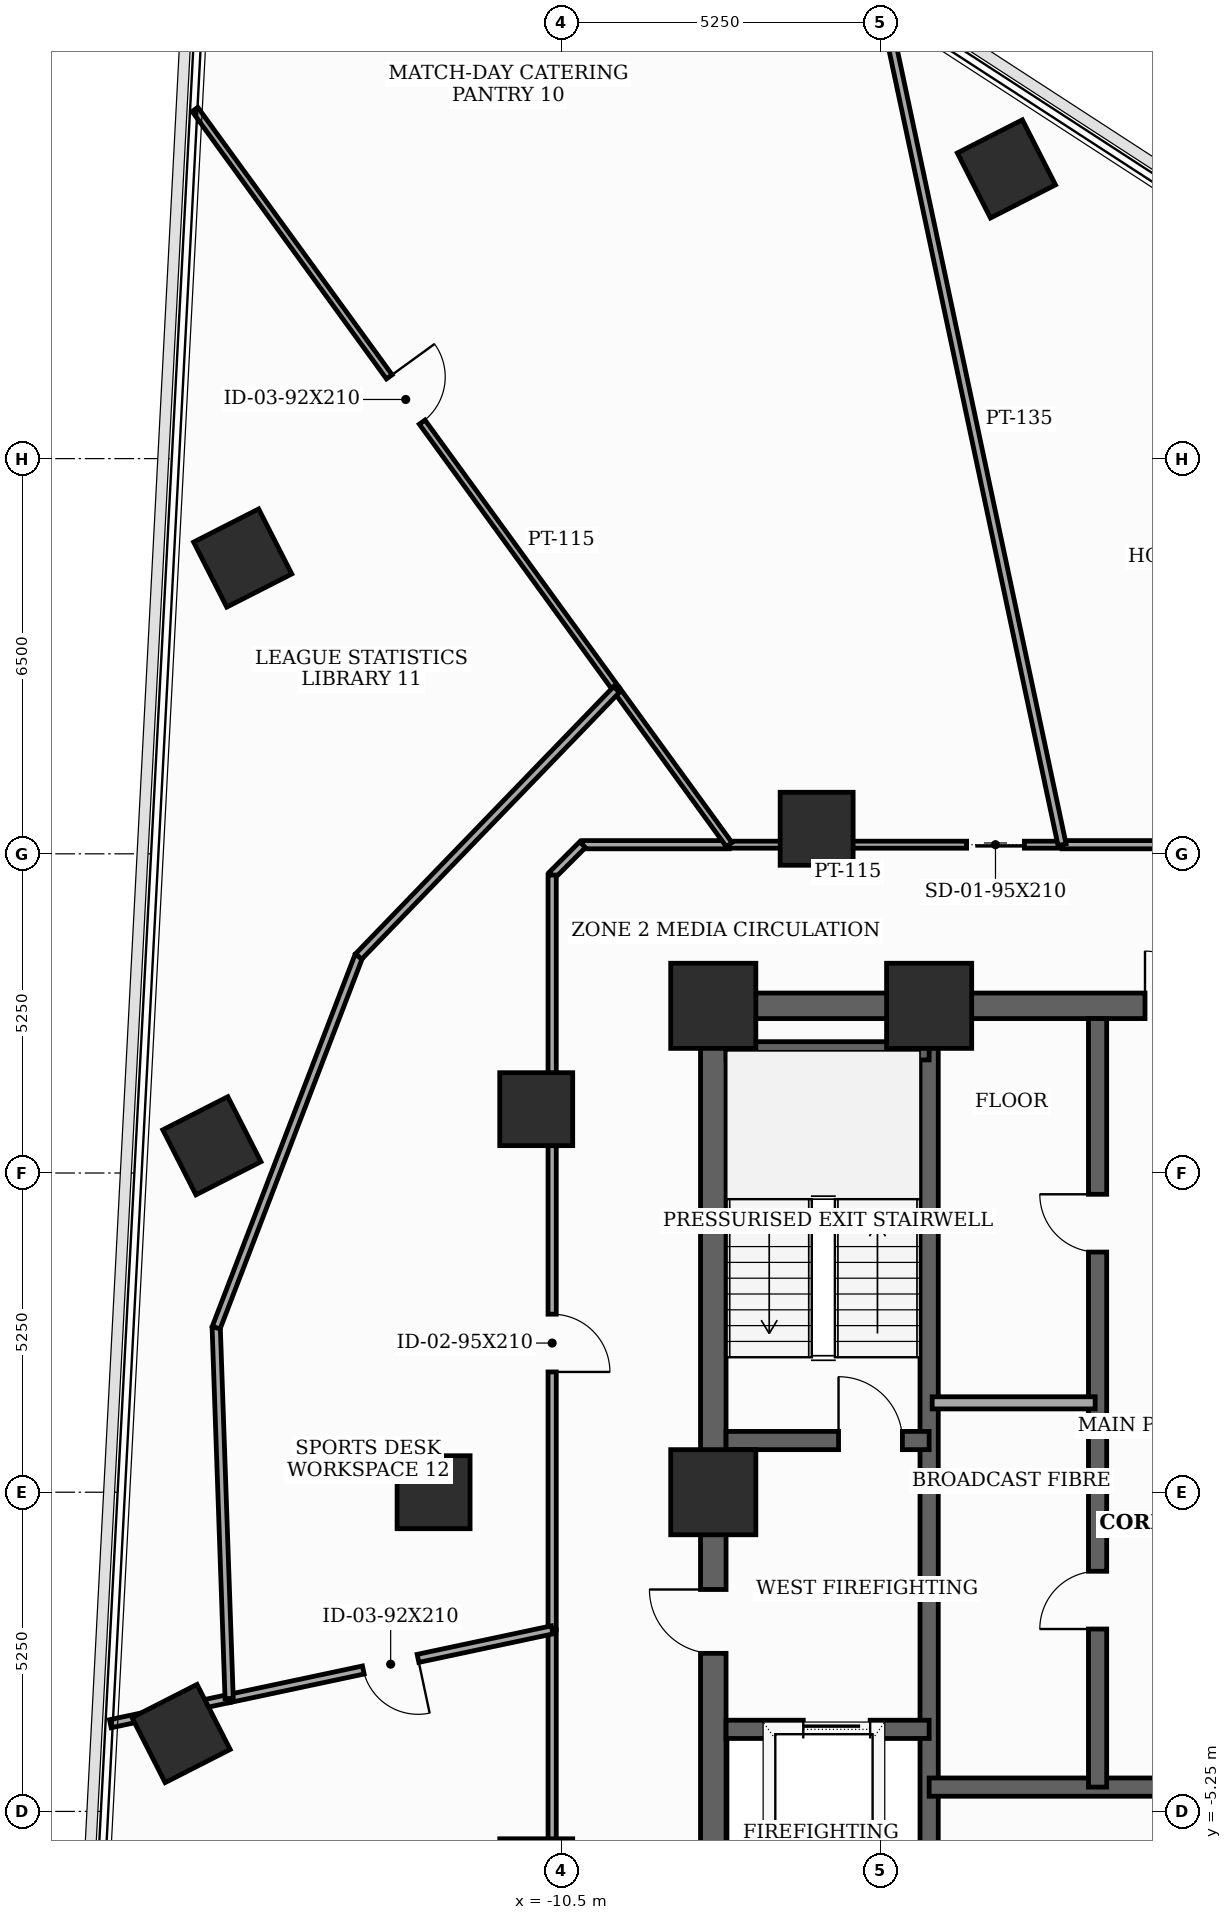
"""IFC4 building model, lengths in metres.
Left out: names, types, materials, properties, quantities, classifications, styles, units other than length and angle.
Written with IfcOpenShell. Run it as: python <this file> out.ifc"""

import sys

from ifc_helpers import new_model, si_unit, direction, frame, frame_2d, origin, origin_2d, place, context, subcontext, project, spatial, rectangle, extrude, element, fill, save


model = new_model("IFC4")
c1 = context("Model", 3, precision=1e-05, world=origin(), true_north=direction((0.0, 1.0)))
c2 = subcontext(c1, "Body", "Model", "MODEL_VIEW")
j1 = project(units=[si_unit("LENGTHUNIT", "METRE"), si_unit("PLANEANGLEUNIT", "RADIAN")], contexts=[c1])
p1 = place(None, origin())
s1 = spatial("IfcSite", under=j1, at=p1, CompositionType="ELEMENT")
p2 = place(p1, origin())
s2 = spatial("IfcBuilding", under=s1, at=p2, CompositionType="ELEMENT")
p3 = place(p2, frame((0.0, 0.0, 123.6)))
s3 = spatial("IfcBuildingStorey", under=s2, at=p3, CompositionType="ELEMENT", Elevation=123.6)
for number, where, z_axis, x_axis in (
    (1, (-4.45, 8.0, 0.0), (0.0, 0.0, 1.0), (1.0, 0.0, 0.0)),
    (2, (-8.0, 8.0, 0.0), (0.0, 0.0, 1.0), (1.0, 0.0, 0.0)),
    (3, (-8.0, 0.0, 0.0), (0.0, 0.0, 1.0), (1.0, 0.0, 0.0)),
):
    element("IfcColumn", number, at=place(p3, frame(where, z_axis=z_axis, x_axis=x_axis)), inside=s3, PredefinedType="COLUMN", context=c2, shape_type="SweptSolid", body=[
        extrude(rectangle(XDim=1.4, YDim=1.4, at=origin_2d()), origin(), (0.0, 0.0, 1.0), 3.7),
    ])
for number, where, z_axis, x_axis in (
    (4, (-6.3, 10.912, 0.0), (0.0, 0.0, 1.0), (1.0, 0.0, 0.0)),
    (5, (-10.912, 6.3, 0.0), (0.0, 0.0, 1.0), (1.0, 0.0, 0.0)),
    (6, (-12.6, 0.0, 0.0), (0.0, 0.0, 1.0), (1.0, 0.0, 0.0)),
    (7, (-10.912, -6.3, 0.0), (0.0, 0.0, 1.0), (1.0, 0.0, 0.0)),
    (8, (-3.179, 21.765, 0.0), (0.0, 0.0, 1.0), (0.891, 0.454, 0.0)),
    (9, (-15.739, 15.365, 0.0), (0.0, 0.0, 1.0), (0.891, 0.454, 0.0)),
    (10, (-16.246, 5.698, 0.0), (0.0, 0.0, 1.0), (0.891, 0.454, 0.0)),
    (11, (-16.752, -3.969, 0.0), (0.0, 0.0, 1.0), (0.891, 0.454, 0.0)),
):
    element("IfcColumn", number, at=place(p3, frame(where, z_axis=z_axis, x_axis=x_axis)), inside=s3, PredefinedType="COLUMN", context=c2, shape_type="SweptSolid", body=[
        extrude(rectangle(XDim=1.2, YDim=1.2, at=origin_2d()), origin(), (0.0, 0.0, 1.0), 3.7),
    ])
p4 = place(p3, frame((-8.0, -8.0, 0.0), z_axis=(0.0, 0.0, 1.0), x_axis=(0.0, 1.0, 0.0)))
e12 = element("IfcWall", 12, at=p4, inside=s3, PredefinedType="SHEAR", context=c2, shape_type="SweptSolid", body=[
    extrude(rectangle(XDim=16.0, YDim=0.42, at=frame_2d((8.0, 0.0))), origin(), (0.0, 0.0, 1.0), 3.5),
])
p5 = place(p4, frame((0.922, 0.0, 0.0)))
e13 = element("IfcOpeningElement", 13, at=p5, cuts=e12, PredefinedType="OPENING", context=c2, shape_type="SweptSolid", body=[
    extrude(rectangle(XDim=0.85, YDim=2.02, at=frame_2d((0.425, 1.01))), frame((0.0, 0.22, 0.0), z_axis=(0.0, -1.0, 0.0), x_axis=(1.0, 0.0, 0.0)), (0.0, 0.0, 1.0), 0.44),
])
p6 = place(p4, frame((5.35, 0.0, 0.0)))
e14 = element("IfcOpeningElement", 14, at=p6, cuts=e12, PredefinedType="OPENING", context=c2, shape_type="SweptSolid", body=[
    extrude(rectangle(XDim=1.05, YDim=2.15, at=frame_2d((0.525, 1.075))), frame((0.0, 0.22, 0.0), z_axis=(0.0, -1.0, 0.0), x_axis=(1.0, 0.0, 0.0)), (0.0, 0.0, 1.0), 0.44),
])
p7 = place(p3, frame((-8.0, 8.0, 0.0), z_axis=(0.0, 0.0, 1.0), x_axis=(1.0, 0.0, 0.0)))
e15 = element("IfcWall", 15, at=p7, inside=s3, PredefinedType="SHEAR", context=c2, shape_type="SweptSolid", body=[
    extrude(rectangle(XDim=16.0, YDim=0.42, at=frame_2d((8.0, 0.0))), origin(), (0.0, 0.0, 1.0), 3.5),
])
p8 = place(p7, frame((7.1, 0.0, 0.0)))
e16 = element("IfcOpeningElement", 16, at=p8, cuts=e15, PredefinedType="OPENING", context=c2, shape_type="SweptSolid", body=[
    extrude(rectangle(XDim=1.8, YDim=2.15, at=frame_2d((0.9, 1.075))), frame((0.0, 0.22, 0.0), z_axis=(0.0, -1.0, 0.0), x_axis=(1.0, 0.0, 0.0)), (0.0, 0.0, 1.0), 0.44),
])
p9 = place(p3, frame((-4.45, -7.79, 0.0), z_axis=(0.0, 0.0, 1.0), x_axis=(0.0, 1.0, 0.0)))
e17 = element("IfcWall", 17, at=p9, inside=s3, PredefinedType="SHEAR", context=c2, shape_type="SweptSolid", body=[
    extrude(rectangle(XDim=15.58, YDim=0.3, at=frame_2d((7.79, 0.0))), origin(), (0.0, 0.0, 1.0), 3.5),
])
p10 = place(p3, frame((-7.79, 0.85, 0.0), z_axis=(0.0, 0.0, 1.0), x_axis=(1.0, 0.0, 0.0)))
e18 = element("IfcWall", 18, at=p10, inside=s3, PredefinedType="SHEAR", context=c2, shape_type="SweptSolid", body=[
    extrude(rectangle(XDim=3.34, YDim=0.3, at=frame_2d((1.67, 0.0))), origin(), (0.0, 0.0, 1.0), 3.5),
])
p11 = place(p10, frame((1.85, 0.0, 0.0)))
e19 = element("IfcOpeningElement", 19, at=p11, cuts=e18, PredefinedType="OPENING", context=c2, shape_type="SweptSolid", body=[
    extrude(rectangle(XDim=1.05, YDim=2.15, at=frame_2d((0.525, 1.075))), frame((0.0, 0.16, 0.0), z_axis=(0.0, -1.0, 0.0), x_axis=(1.0, 0.0, 0.0)), (0.0, 0.0, 1.0), 0.32),
])
p12 = place(p3, frame((-7.79, 7.26, 0.0), z_axis=(0.0, 0.0, 1.0), x_axis=(1.0, 0.0, 0.0)))
e20 = element("IfcWall", 20, at=p12, inside=s3, PredefinedType="SHEAR", context=c2, shape_type="SweptSolid", body=[
    extrude(rectangle(XDim=3.34, YDim=0.3, at=frame_2d((1.67, 0.0))), origin(), (0.0, 0.0, 1.0), 3.5),
])
p13 = place(p3, frame((-7.79, -3.9, 0.0), z_axis=(0.0, 0.0, 1.0), x_axis=(1.0, 0.0, 0.0)))
e21 = element("IfcWall", 21, at=p13, inside=s3, PredefinedType="SHEAR", context=c2, shape_type="SweptSolid", body=[
    extrude(rectangle(XDim=3.34, YDim=0.3, at=frame_2d((1.67, 0.0))), origin(), (0.0, 0.0, 1.0), 3.5),
])
p14 = place(p13, frame((1.27, 0.0, 0.0)))
e22 = element("IfcOpeningElement", 22, at=p14, cuts=e21, PredefinedType="OPENING", context=c2, shape_type="SweptSolid", body=[
    extrude(rectangle(XDim=1.1, YDim=2.1, at=frame_2d((0.55, 1.05))), frame((0.0, 0.16, 0.0), z_axis=(0.0, -1.0, 0.0), x_axis=(1.0, 0.0, 0.0)), (0.0, 0.0, 1.0), 0.32),
])
p15 = place(p3, frame((-4.45, -4.85, 0.0), z_axis=(0.0, 0.0, 1.0), x_axis=(1.0, 0.0, 0.0)))
e23 = element("IfcWall", 23, at=p15, inside=s3, PredefinedType="SHEAR", context=c2, shape_type="SweptSolid", body=[
    extrude(rectangle(XDim=8.9, YDim=0.3, at=frame_2d((4.45, 0.0))), origin(), (0.0, 0.0, 1.0), 3.5),
])
p16 = place(p3, frame((-1.68, -4.85, 0.0), z_axis=(0.0, 0.0, 1.0), x_axis=(0.0, 1.0, 0.0)))
e24 = element("IfcWall", 24, at=p16, inside=s3, PredefinedType="SHEAR", context=c2, shape_type="SweptSolid", body=[
    extrude(rectangle(XDim=12.64, YDim=0.3, at=frame_2d((6.32, 0.0))), origin(), (0.0, 0.0, 1.0), 3.5),
])
p17 = place(p16, frame((2.6, 0.0, 0.0)))
e25 = element("IfcOpeningElement", 25, at=p17, cuts=e24, PredefinedType="OPENING", context=c2, shape_type="SweptSolid", body=[
    extrude(rectangle(XDim=0.95, YDim=2.1, at=frame_2d((0.475, 1.05))), frame((0.0, 0.16, 0.0), z_axis=(0.0, -1.0, 0.0), x_axis=(1.0, 0.0, 0.0)), (0.0, 0.0, 1.0), 0.32),
])
p18 = place(p16, frame((8.8, 0.0, 0.0)))
e26 = element("IfcOpeningElement", 26, at=p18, cuts=e24, PredefinedType="OPENING", context=c2, shape_type="SweptSolid", body=[
    extrude(rectangle(XDim=0.95, YDim=2.1, at=frame_2d((0.475, 1.05))), frame((0.0, 0.16, 0.0), z_axis=(0.0, -1.0, 0.0), x_axis=(1.0, 0.0, 0.0)), (0.0, 0.0, 1.0), 0.32),
])
p19 = place(p3, frame((-4.4, 1.47, 0.0), z_axis=(0.0, 0.0, 1.0), x_axis=(1.0, 0.0, 0.0)))
e27 = element("IfcWall", 27, at=p19, inside=s3, PredefinedType="SOLIDWALL", context=c2, shape_type="SweptSolid", body=[
    extrude(rectangle(XDim=2.68, YDim=0.2, at=frame_2d((1.34, 0.0))), origin(), (0.0, 0.0, 1.0), 3.5),
])
p20 = place(p3, frame((-10.65, -2.264, 0.0), z_axis=(0.0, 0.0, 1.0), x_axis=(0.0, -1.0, 0.0)))
e28 = element("IfcWall", 28, at=p20, inside=s3, PredefinedType="PARTITIONING", context=c2, shape_type="SweptSolid", body=[
    extrude(rectangle(XDim=7.886, YDim=0.135, at=frame_2d((3.943, 0.0))), origin(), (0.0, 0.0, 1.0), 2.785),
])
p21 = place(p3, frame((10.15, 10.65, 0.0), z_axis=(0.0, 0.0, 1.0), x_axis=(-1.0, 0.0, 0.0)))
e29 = element("IfcWall", 29, at=p21, inside=s3, PredefinedType="PARTITIONING", context=c2, shape_type="SweptSolid", body=[
    extrude(rectangle(XDim=12.414, YDim=0.135, at=frame_2d((6.207, 0.0))), origin(), (0.0, 0.0, 1.0), 2.785),
])
p22 = place(p21, frame((7.222, 0.0, 0.0)))
e30 = element("IfcOpeningElement", 30, at=p22, cuts=e29, PredefinedType="OPENING", context=c2, shape_type="SweptSolid", body=[
    extrude(rectangle(XDim=0.95, YDim=2.1, at=frame_2d((0.475, 1.05))), frame((0.0, 0.077, 0.0), z_axis=(0.0, -1.0, 0.0), x_axis=(1.0, 0.0, 0.0)), (0.0, 0.0, 1.0), 0.155),
])
p23 = place(p3, frame((-2.264, 10.65, 0.0), z_axis=(0.0, 0.0, 1.0), x_axis=(-1.0, 0.0, 0.0)))
e31 = element("IfcWall", 31, at=p23, inside=s3, PredefinedType="PARTITIONING", context=c2, shape_type="SweptSolid", body=[
    extrude(rectangle(XDim=5.474, YDim=0.115, at=frame_2d((2.737, 0.0))), origin(), (0.0, 0.0, 1.0), 2.785),
])
p24 = place(p23, frame((0.62, 0.0, 0.0)))
e32 = element("IfcOpeningElement", 32, at=p24, cuts=e31, PredefinedType="OPENING", context=c2, shape_type="SweptSolid", body=[
    extrude(rectangle(XDim=0.95, YDim=2.1, at=frame_2d((0.475, 1.05))), frame((0.0, 0.067, 0.0), z_axis=(0.0, -1.0, 0.0), x_axis=(1.0, 0.0, 0.0)), (0.0, 0.0, 1.0), 0.135),
])
p25 = place(p3, frame((-7.738, 10.65, 0.0), z_axis=(0.0, 0.0, 1.0), x_axis=(-1.0, 0.0, 0.0)))
e33 = element("IfcWall", 33, at=p25, inside=s3, PredefinedType="PARTITIONING", context=c2, shape_type="SweptSolid", body=[
    extrude(rectangle(XDim=2.412, YDim=0.135, at=frame_2d((1.206, 0.0))), origin(), (0.0, 0.0, 1.0), 3.5),
])
p26 = place(p3, frame((-10.15, 10.65, 0.0), z_axis=(0.0, 0.0, 1.0), x_axis=(-0.707106781187, -0.707106781187, 0.0)))
e34 = element("IfcWall", 34, at=p26, inside=s3, PredefinedType="PARTITIONING", context=c2, shape_type="SweptSolid", body=[
    extrude(rectangle(XDim=0.707, YDim=0.135, at=frame_2d((0.354, 0.0))), origin(), (0.0, 0.0, 1.0), 3.5),
])
p27 = place(p3, frame((-10.65, 10.15, 0.0), z_axis=(0.0, 0.0, 1.0), x_axis=(0.0, -1.0, 0.0)))
e35 = element("IfcWall", 35, at=p27, inside=s3, PredefinedType="PARTITIONING", context=c2, shape_type="SweptSolid", body=[
    extrude(rectangle(XDim=12.414, YDim=0.135, at=frame_2d((6.207, 0.0))), origin(), (0.0, 0.0, 1.0), 2.785),
])
p28 = place(p27, frame((7.222, 0.0, 0.0)))
e36 = element("IfcOpeningElement", 36, at=p28, cuts=e35, PredefinedType="OPENING", context=c2, shape_type="SweptSolid", body=[
    extrude(rectangle(XDim=0.95, YDim=2.1, at=frame_2d((0.475, 1.05))), frame((0.0, 0.077, 0.0), z_axis=(0.0, -1.0, 0.0), x_axis=(1.0, 0.0, 0.0)), (0.0, 0.0, 1.0), 0.155),
])
p29 = place(p3, frame((-15.962, -3.393, 0.0), z_axis=(0.0, 0.0, 1.0), x_axis=(-0.978224349737, -0.207550286874, 0.0)))
e37 = element("IfcWall", 37, at=p29, inside=s3, PredefinedType="PARTITIONING", context=c2, shape_type="SweptSolid", body=[
    extrude(rectangle(XDim=1.997, YDim=0.135, at=frame_2d((0.999, 0.0))), origin(), (0.0, 0.0, 1.0), 2.885),
])
p30 = place(p3, frame((-10.65, -2.264, 0.0), z_axis=(0.0, 0.0, 1.0), x_axis=(-0.978145824013, -0.207920049456, 0.0)))
e38 = element("IfcWall", 38, at=p30, inside=s3, PredefinedType="PARTITIONING", context=c2, shape_type="SweptSolid", body=[
    extrude(rectangle(XDim=5.431, YDim=0.135, at=frame_2d((2.715, 0.0))), origin(), (0.0, 0.0, 1.0), 2.785),
])
p31 = place(p30, frame((2.255, 0.0, 0.0)))
e39 = element("IfcOpeningElement", 39, at=p31, cuts=e38, PredefinedType="OPENING", context=c2, shape_type="SweptSolid", body=[
    extrude(rectangle(XDim=0.92, YDim=2.1, at=frame_2d((0.46, 1.05))), frame((0.0, 0.077, 0.0), z_axis=(0.0, -1.0, 0.0), x_axis=(1.0, 0.0, 0.0)), (0.0, 0.0, 1.0), 0.155),
])
p32 = place(p3, frame((-5.202, 24.473, 0.0), z_axis=(0.0, 0.0, 1.0), x_axis=(0.207879417489, -0.978154460085, 0.0)))
e40 = element("IfcWall", 40, at=p32, inside=s3, PredefinedType="PARTITIONING", context=c2, shape_type="SweptSolid", body=[
    extrude(rectangle(XDim=14.132, YDim=0.135, at=frame_2d((7.066, 0.0))), origin(), (0.0, 0.0, 1.0), 2.785),
])
p33 = place(p3, frame((-16.524, 22.743, 0.0), z_axis=(0.0, 0.0, 1.0), x_axis=(0.587785136625, -0.809017078412, 0.0)))
e41 = element("IfcWall", 41, at=p33, inside=s3, PredefinedType="PARTITIONING", context=c2, shape_type="SweptSolid", body=[
    extrude(rectangle(XDim=11.794, YDim=0.115, at=frame_2d((5.897, 0.0))), origin(), (0.0, 0.0, 1.0), 2.985),
])
p34 = place(p33, frame((5.437, 0.0, 0.0)))
e42 = element("IfcOpeningElement", 42, at=p34, cuts=e41, PredefinedType="OPENING", context=c2, shape_type="SweptSolid", body=[
    extrude(rectangle(XDim=0.92, YDim=2.1, at=frame_2d((0.46, 1.05))), frame((0.0, 0.067, 0.0), z_axis=(0.0, -1.0, 0.0), x_axis=(1.0, 0.0, 0.0)), (0.0, 0.0, 1.0), 0.135),
])
p35 = place(p3, frame((-9.592, 13.202, 0.0), z_axis=(0.0, 0.0, 1.0), x_axis=(0.587757438745, -0.80903720137, 0.0)))
e43 = element("IfcWall", 43, at=p35, inside=s3, PredefinedType="PARTITIONING", context=c2, shape_type="SweptSolid", body=[
    extrude(rectangle(XDim=3.154, YDim=0.115, at=frame_2d((1.577, 0.0))), origin(), (0.0, 0.0, 1.0), 3.5),
])
p36 = place(p3, frame((-15.962, -3.393, 0.0), z_axis=(0.0, 0.0, 1.0), x_axis=(-0.034918259019, 0.999390171648, 0.0)))
e44 = element("IfcWall", 44, at=p36, inside=s3, PredefinedType="PARTITIONING", context=c2, shape_type="SweptSolid", body=[
    extrude(rectangle(XDim=6.104, YDim=0.135, at=frame_2d((3.052, 0.0))), origin(), (0.0, 0.0, 1.0), 2.885),
])
p37 = place(p3, frame((-16.175, 2.707, 0.0), z_axis=(0.0, 0.0, 1.0), x_axis=(0.358305989998, 0.93360420818, 0.0)))
e45 = element("IfcWall", 45, at=p37, inside=s3, PredefinedType="PARTITIONING", context=c2, shape_type="SweptSolid", body=[
    extrude(rectangle(XDim=6.539, YDim=0.135, at=frame_2d((3.27, 0.0))), origin(), (0.0, 0.0, 1.0), 2.885),
])
p38 = place(p3, frame((-13.832, 8.812, 0.0), z_axis=(0.0, 0.0, 1.0), x_axis=(0.694719433394, 0.719280827538, 0.0)))
e46 = element("IfcWall", 46, at=p38, inside=s3, PredefinedType="PARTITIONING", context=c2, shape_type="SweptSolid", body=[
    extrude(rectangle(XDim=6.103, YDim=0.135, at=frame_2d((3.052, 0.0))), origin(), (0.0, 0.0, 1.0), 2.885),
])
p39 = place(p6, origin())
e47 = element("IfcDoor", 47, at=p39, inside=s3, OperationType="SINGLE_SWING_RIGHT", PredefinedType="DOOR", context=c2, shape_type="SweptSolid", body=[
    extrude(rectangle(XDim=1.05, YDim=2.15, at=frame_2d((0.525, 1.075))), frame((0.0, 0.025, 0.0), z_axis=(0.0, -1.0, 0.0), x_axis=(1.0, 0.0, 0.0)), (0.0, 0.0, 1.0), 0.05),
])
fill(e14, e47)
p40 = place(p8, origin())
e48 = element("IfcDoor", 48, at=p40, inside=s3, OperationType="DOUBLE_DOOR_SINGLE_SWING", PredefinedType="DOOR", context=c2, shape_type="SweptSolid", body=[
    extrude(rectangle(XDim=1.8, YDim=2.15, at=frame_2d((0.9, 1.075))), frame((0.0, 0.025, 0.0), z_axis=(0.0, -1.0, 0.0), x_axis=(1.0, 0.0, 0.0)), (0.0, 0.0, 1.0), 0.05),
])
fill(e16, e48)
p41 = place(p11, origin())
e49 = element("IfcDoor", 49, at=p41, inside=s3, OperationType="SINGLE_SWING_LEFT", PredefinedType="DOOR", context=c2, shape_type="SweptSolid", body=[
    extrude(rectangle(XDim=1.05, YDim=2.15, at=frame_2d((0.525, 1.075))), frame((0.0, 0.025, 0.0), z_axis=(0.0, -1.0, 0.0), x_axis=(1.0, 0.0, 0.0)), (0.0, 0.0, 1.0), 0.05),
])
fill(e19, e49)
p42 = place(p14, origin())
e50 = element("IfcDoor", 50, at=p42, inside=s3, OperationType="SLIDING_TO_LEFT", PredefinedType="DOOR", context=c2, shape_type="SweptSolid", body=[
    extrude(rectangle(XDim=1.1, YDim=2.1, at=frame_2d((0.55, 1.05))), frame((0.0, 0.025, 0.0), z_axis=(0.0, -1.0, 0.0), x_axis=(1.0, 0.0, 0.0)), (0.0, 0.0, 1.0), 0.05),
])
fill(e22, e50)
p43 = place(p17, origin())
e51 = element("IfcDoor", 51, at=p43, inside=s3, OperationType="SINGLE_SWING_LEFT", PredefinedType="DOOR", context=c2, shape_type="SweptSolid", body=[
    extrude(rectangle(XDim=0.95, YDim=2.1, at=frame_2d((0.475, 1.05))), frame((0.0, 0.025, 0.0), z_axis=(0.0, -1.0, 0.0), x_axis=(1.0, 0.0, 0.0)), (0.0, 0.0, 1.0), 0.05),
])
fill(e25, e51)
p44 = place(p18, origin())
e52 = element("IfcDoor", 52, at=p44, inside=s3, OperationType="SINGLE_SWING_RIGHT", PredefinedType="DOOR", context=c2, shape_type="SweptSolid", body=[
    extrude(rectangle(XDim=0.95, YDim=2.1, at=frame_2d((0.475, 1.05))), frame((0.0, 0.025, 0.0), z_axis=(0.0, -1.0, 0.0), x_axis=(1.0, 0.0, 0.0)), (0.0, 0.0, 1.0), 0.05),
])
fill(e26, e52)
p45 = place(p24, origin())
e53 = element("IfcDoor", 53, at=p45, inside=s3, OperationType="SLIDING_TO_LEFT", PredefinedType="DOOR", context=c2, shape_type="SweptSolid", body=[
    extrude(rectangle(XDim=0.95, YDim=2.1, at=frame_2d((0.475, 1.05))), frame((0.0, 0.025, 0.0), z_axis=(0.0, -1.0, 0.0), x_axis=(1.0, 0.0, 0.0)), (0.0, 0.0, 1.0), 0.05),
])
fill(e32, e53)
p46 = place(p28, origin())
e54 = element("IfcDoor", 54, at=p46, inside=s3, OperationType="SINGLE_SWING_RIGHT", PredefinedType="DOOR", context=c2, shape_type="SweptSolid", body=[
    extrude(rectangle(XDim=0.95, YDim=2.1, at=frame_2d((0.475, 1.05))), frame((0.0, 0.025, 0.0), z_axis=(0.0, -1.0, 0.0), x_axis=(1.0, 0.0, 0.0)), (0.0, 0.0, 1.0), 0.05),
])
fill(e36, e54)
p47 = place(p31, origin())
e55 = element("IfcDoor", 55, at=p47, inside=s3, OperationType="SINGLE_SWING_LEFT", PredefinedType="DOOR", context=c2, shape_type="SweptSolid", body=[
    extrude(rectangle(XDim=0.92, YDim=2.1, at=frame_2d((0.46, 1.05))), frame((0.0, 0.025, 0.0), z_axis=(0.0, -1.0, 0.0), x_axis=(1.0, 0.0, 0.0)), (0.0, 0.0, 1.0), 0.05),
])
fill(e39, e55)
p48 = place(p34, origin())
e56 = element("IfcDoor", 56, at=p48, inside=s3, OperationType="SINGLE_SWING_LEFT", PredefinedType="DOOR", context=c2, shape_type="SweptSolid", body=[
    extrude(rectangle(XDim=0.92, YDim=2.1, at=frame_2d((0.46, 1.05))), frame((0.0, 0.025, 0.0), z_axis=(0.0, -1.0, 0.0), x_axis=(1.0, 0.0, 0.0)), (0.0, 0.0, 1.0), 0.05),
])
fill(e42, e56)
save(model, sys.argv[1])
